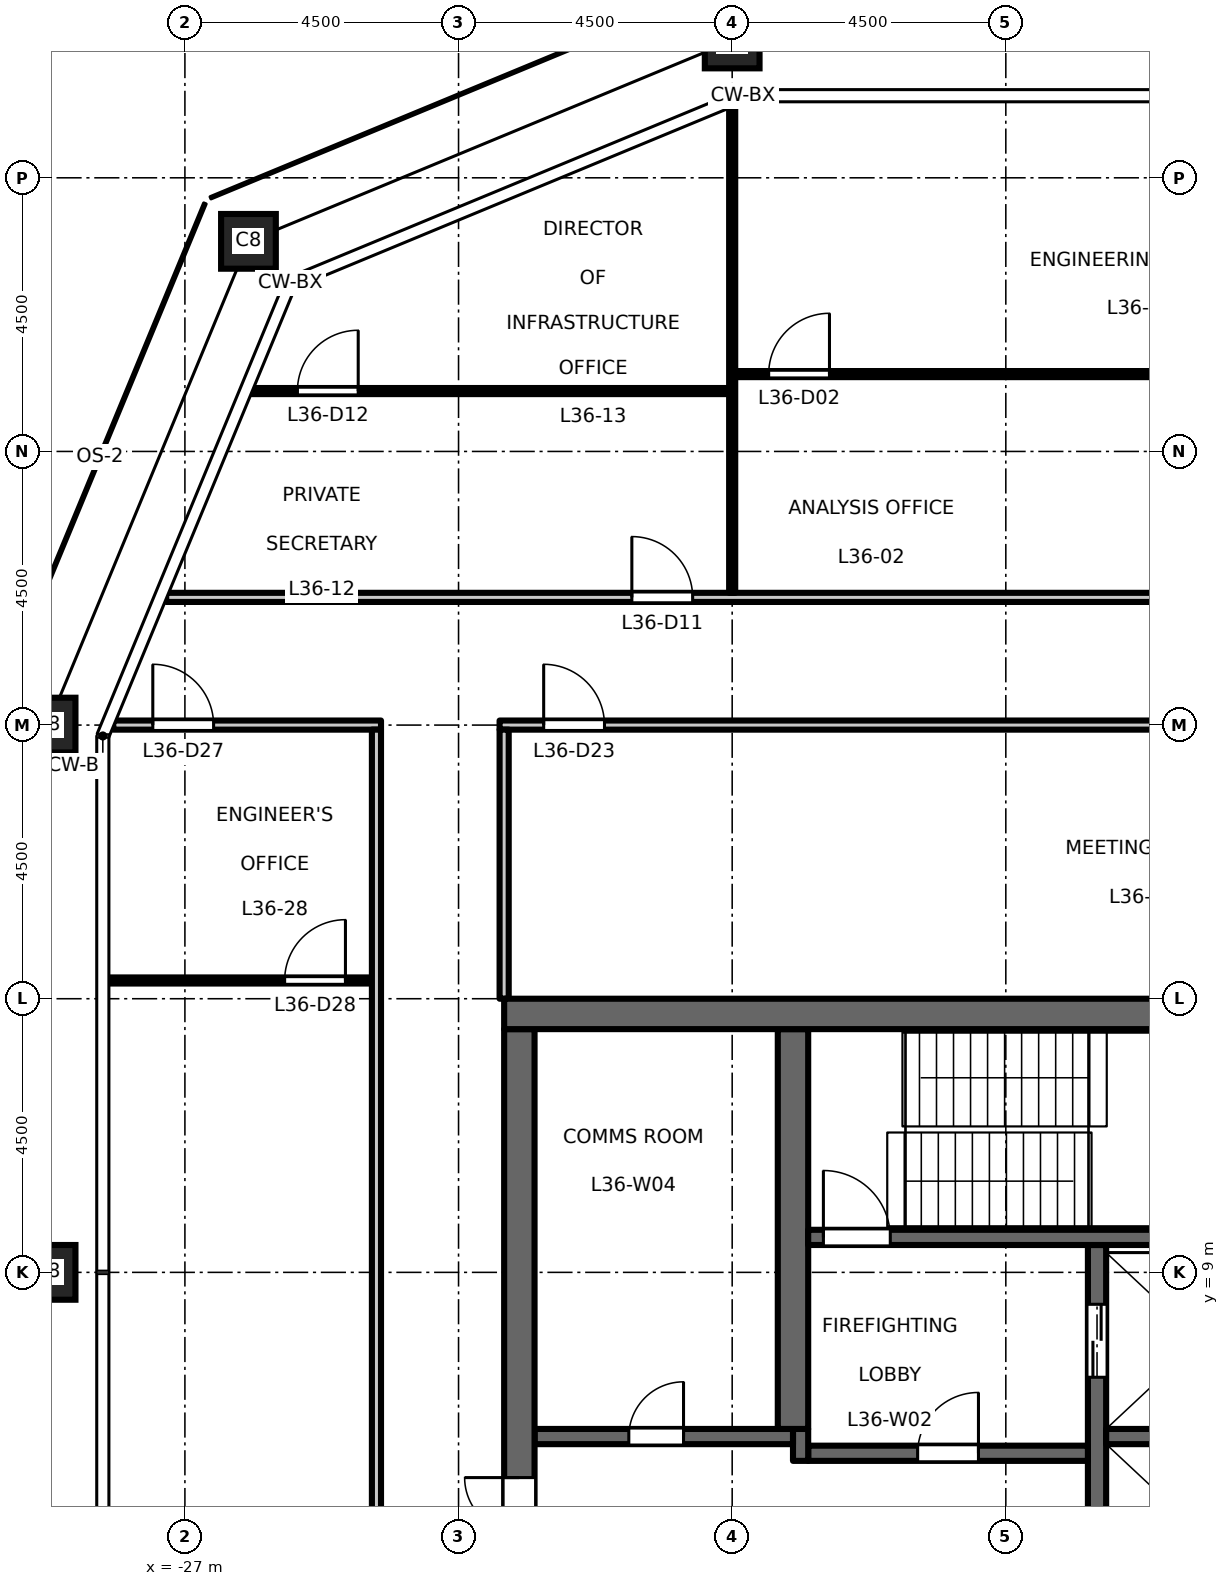
"""IFC4 building model, lengths in metres.
Left out: names, types, materials, properties, quantities, classifications, styles, units other than length and angle.
Written with IfcOpenShell. Run it as: python <this file> out.ifc"""

import sys

from ifc_helpers import new_model, si_unit, direction, frame, frame_2d, origin, origin_2d, place, context, subcontext, project, spatial, rectangle, hollow_rectangle, extrude, element, fill, save


model = new_model("IFC4")
c1 = context("Model", 3, precision=1e-05, world=origin(), true_north=direction((0.0, 1.0)))
c2 = subcontext(c1, "Body", "Model", "MODEL_VIEW")
j1 = project(units=[si_unit("LENGTHUNIT", "METRE"), si_unit("PLANEANGLEUNIT", "RADIAN")], contexts=[c1])
p1 = place(None, origin())
s1 = spatial("IfcSite", under=j1, at=p1, CompositionType="ELEMENT")
p2 = place(p1, origin())
s2 = spatial("IfcBuilding", under=s1, at=p2, CompositionType="ELEMENT")
p3 = place(p2, frame((0.0, 0.0, 167.7)))
s3 = spatial("IfcBuildingStorey", under=s2, at=p3, CompositionType="ELEMENT", Elevation=167.7)
for number, where, z_axis, x_axis in (
    (1, (-18.0, 29.25, 0.0), (0.0, 0.0, 1.0), (1.0, 0.0, 0.0)),
    (2, (-25.955, 25.955, 0.0), (0.0, 0.0, 1.0), (1.0, 0.0, 0.0)),
    (3, (-29.25, 18.0, 0.0), (0.0, 0.0, 1.0), (1.0, 0.0, 0.0)),
    (4, (-29.25, 9.0, 0.0), (0.0, 0.0, 1.0), (1.0, 0.0, 0.0)),
):
    element("IfcColumn", number, at=place(p3, frame(where, z_axis=z_axis, x_axis=x_axis)), inside=s3, PredefinedType="COLUMN", context=c2, shape_type="SweptSolid", body=[
        extrude(hollow_rectangle(XDim=0.9, YDim=0.9, WallThickness=0.05, at=origin_2d()), origin(), (0.0, 0.0, 1.0), 4.5),
    ])
p4 = place(p3, frame((-12.0, -9.45, 0.0), z_axis=(0.0, 0.0, 1.0), x_axis=(0.0, 1.0, 0.0)))
e5 = element("IfcWall", 5, at=p4, inside=s3, PredefinedType="SHEAR", context=c2, shape_type="SweptSolid", body=[
    extrude(rectangle(XDim=18.9, YDim=0.3, at=frame_2d((9.45, 0.0))), origin(), (0.0, 0.0, 1.0), 4.35),
])
p5 = place(p4, frame((3.625, 0.0, 0.0)))
e6 = element("IfcOpeningElement", 6, at=p5, cuts=e5, PredefinedType="OPENING", context=c2, shape_type="SweptSolid", body=[
    extrude(rectangle(XDim=1.1, YDim=2.1, at=frame_2d((0.55, 1.05))), frame((0.0, 0.16, 0.0), z_axis=(0.0, -1.0, 0.0), x_axis=(1.0, 0.0, 0.0)), (0.0, 0.0, 1.0), 0.32),
])
p6 = place(p4, frame((6.775, 0.0, 0.0)))
e7 = element("IfcOpeningElement", 7, at=p6, cuts=e5, PredefinedType="OPENING", context=c2, shape_type="SweptSolid", body=[
    extrude(rectangle(XDim=1.1, YDim=2.1, at=frame_2d((0.55, 1.05))), frame((0.0, 0.16, 0.0), z_axis=(0.0, -1.0, 0.0), x_axis=(1.0, 0.0, 0.0)), (0.0, 0.0, 1.0), 0.32),
])
p7 = place(p4, frame((9.925, 0.0, 0.0)))
e8 = element("IfcOpeningElement", 8, at=p7, cuts=e5, PredefinedType="OPENING", context=c2, shape_type="SweptSolid", body=[
    extrude(rectangle(XDim=1.1, YDim=2.1, at=frame_2d((0.55, 1.05))), frame((0.0, 0.16, 0.0), z_axis=(0.0, -1.0, 0.0), x_axis=(1.0, 0.0, 0.0)), (0.0, 0.0, 1.0), 0.32),
])
p8 = place(p4, frame((13.075, 0.0, 0.0)))
e9 = element("IfcOpeningElement", 9, at=p8, cuts=e5, PredefinedType="OPENING", context=c2, shape_type="SweptSolid", body=[
    extrude(rectangle(XDim=1.1, YDim=2.1, at=frame_2d((0.55, 1.05))), frame((0.0, 0.16, 0.0), z_axis=(0.0, -1.0, 0.0), x_axis=(1.0, 0.0, 0.0)), (0.0, 0.0, 1.0), 0.32),
])
p9 = place(p4, frame((16.725, 0.0, 0.0)))
e10 = element("IfcOpeningElement", 10, at=p9, cuts=e5, PredefinedType="OPENING", context=c2, shape_type="SweptSolid", body=[
    extrude(rectangle(XDim=1.2, YDim=2.1, at=frame_2d((0.6, 1.05))), frame((0.0, 0.16, 0.0), z_axis=(0.0, -1.0, 0.0), x_axis=(1.0, 0.0, 0.0)), (0.0, 0.0, 1.0), 0.32),
])
p10 = place(p4, frame((0.975, 0.0, 0.0)))
e11 = element("IfcOpeningElement", 11, at=p10, cuts=e5, PredefinedType="OPENING", context=c2, shape_type="SweptSolid", body=[
    extrude(rectangle(XDim=1.2, YDim=2.1, at=frame_2d((0.6, 1.05))), frame((0.0, 0.16, 0.0), z_axis=(0.0, -1.0, 0.0), x_axis=(1.0, 0.0, 0.0)), (0.0, 0.0, 1.0), 0.32),
])
p11 = place(p3, frame((-12.15, 6.025, 0.0), z_axis=(0.0, 0.0, 1.0), x_axis=(-1.0, 0.0, 0.0)))
e12 = element("IfcWall", 12, at=p11, inside=s3, PredefinedType="SHEAR", context=c2, shape_type="SweptSolid", body=[
    extrude(rectangle(XDim=4.6, YDim=0.25, at=frame_2d((2.3, 0.0))), origin(), (0.0, 0.0, 1.0), 4.35),
])
p12 = place(p11, frame((1.8, 0.0, 0.0)))
e13 = element("IfcOpeningElement", 13, at=p12, cuts=e12, PredefinedType="OPENING", context=c2, shape_type="SweptSolid", body=[
    extrude(rectangle(XDim=1.0, YDim=2.1, at=frame_2d((0.5, 1.05))), frame((0.0, 0.135, 0.0), z_axis=(0.0, -1.0, 0.0), x_axis=(1.0, 0.0, 0.0)), (0.0, 0.0, 1.0), 0.27),
])
p13 = place(p3, frame((-16.875, 5.9, 0.0), z_axis=(0.0, 0.0, 1.0), x_axis=(0.0, 1.0, 0.0)))
e14 = element("IfcWall", 14, at=p13, inside=s3, PredefinedType="SHEAR", context=c2, shape_type="SweptSolid", body=[
    extrude(rectangle(XDim=0.525, YDim=0.25, at=frame_2d((0.263, 0.0))), origin(), (0.0, 0.0, 1.0), 4.35),
])
p14 = place(p3, frame((-17.0, 6.3, 0.0), z_axis=(0.0, 0.0, 1.0), x_axis=(-1.0, 0.0, 0.0)))
e15 = element("IfcWall", 15, at=p14, inside=s3, PredefinedType="SHEAR", context=c2, shape_type="SweptSolid", body=[
    extrude(rectangle(XDim=4.25, YDim=0.25, at=frame_2d((2.125, 0.0))), origin(), (0.0, 0.0, 1.0), 4.35),
])
p15 = place(p14, frame((1.8, 0.0, 0.0)))
e16 = element("IfcOpeningElement", 16, at=p15, cuts=e15, PredefinedType="OPENING", context=c2, shape_type="SweptSolid", body=[
    extrude(rectangle(XDim=0.9, YDim=2.1, at=frame_2d((0.45, 1.05))), frame((0.0, 0.135, 0.0), z_axis=(0.0, -1.0, 0.0), x_axis=(1.0, 0.0, 0.0)), (0.0, 0.0, 1.0), 0.27),
])
p16 = place(p3, frame((-21.5, -13.0, 0.0), z_axis=(0.0, 0.0, 1.0), x_axis=(0.0, 1.0, 0.0)))
e17 = element("IfcWall", 17, at=p16, inside=s3, PredefinedType="SHEAR", context=c2, shape_type="SweptSolid", body=[
    extrude(rectangle(XDim=26.0, YDim=0.5, at=frame_2d((13.0, 0.0))), origin(), (0.0, 0.0, 1.0), 4.35),
])
p17 = place(p16, frame((16.825, 0.0, 0.0)))
e18 = element("IfcOpeningElement", 18, at=p17, cuts=e17, PredefinedType="OPENING", context=c2, shape_type="SweptSolid", body=[
    extrude(rectangle(XDim=1.8, YDim=2.1, at=frame_2d((0.9, 1.05))), frame((0.0, 0.26, 0.0), z_axis=(0.0, -1.0, 0.0), x_axis=(1.0, 0.0, 0.0)), (0.0, 0.0, 1.0), 0.52),
])
p18 = place(p16, frame((7.375, 0.0, 0.0)))
e19 = element("IfcOpeningElement", 19, at=p18, cuts=e17, PredefinedType="OPENING", context=c2, shape_type="SweptSolid", body=[
    extrude(rectangle(XDim=1.8, YDim=2.1, at=frame_2d((0.9, 1.05))), frame((0.0, 0.26, 0.0), z_axis=(0.0, -1.0, 0.0), x_axis=(1.0, 0.0, 0.0)), (0.0, 0.0, 1.0), 0.52),
])
p19 = place(p16, frame((2.65, 0.0, 0.0)))
e20 = element("IfcOpeningElement", 20, at=p19, cuts=e17, PredefinedType="OPENING", context=c2, shape_type="SweptSolid", body=[
    extrude(rectangle(XDim=0.9, YDim=2.1, at=frame_2d((0.45, 1.05))), frame((0.0, 0.26, 0.0), z_axis=(0.0, -1.0, 0.0), x_axis=(1.0, 0.0, 0.0)), (0.0, 0.0, 1.0), 0.52),
])
p20 = place(p3, frame((-17.0, 6.425, 0.0), z_axis=(0.0, 0.0, 1.0), x_axis=(0.0, 1.0, 0.0)))
e21 = element("IfcWall", 21, at=p20, inside=s3, PredefinedType="SHEAR", context=c2, shape_type="SweptSolid", body=[
    extrude(rectangle(XDim=6.575, YDim=0.5, at=frame_2d((3.288, 0.0))), origin(), (0.0, 0.0, 1.0), 4.35),
])
p21 = place(p3, frame((-8.75, 6.3, 0.0), z_axis=(0.0, 0.0, 1.0), x_axis=(-1.0, 0.0, 0.0)))
e22 = element("IfcWall", 22, at=p21, inside=s3, PredefinedType="SHEAR", context=c2, shape_type="SweptSolid", body=[
    extrude(rectangle(XDim=3.1, YDim=0.25, at=frame_2d((1.55, 0.0))), origin(), (0.0, 0.0, 1.0), 4.35),
])
p22 = place(p3, frame((-8.75, 9.575, 0.0), z_axis=(0.0, 0.0, 1.0), x_axis=(-1.0, 0.0, 0.0)))
e23 = element("IfcWall", 23, at=p22, inside=s3, PredefinedType="SHEAR", context=c2, shape_type="SweptSolid", body=[
    extrude(rectangle(XDim=8.0, YDim=0.25, at=frame_2d((4.0, 0.0))), origin(), (0.0, 0.0, 1.0), 4.35),
])
p23 = place(p22, frame((6.65, 0.0, 0.0)))
e24 = element("IfcOpeningElement", 24, at=p23, cuts=e23, PredefinedType="OPENING", context=c2, shape_type="SweptSolid", body=[
    extrude(rectangle(XDim=1.1, YDim=2.1, at=frame_2d((0.55, 1.05))), frame((0.0, 0.135, 0.0), z_axis=(0.0, -1.0, 0.0), x_axis=(1.0, 0.0, 0.0)), (0.0, 0.0, 1.0), 0.27),
])
p24 = place(p3, frame((-8.25, 13.25, 0.0), z_axis=(0.0, 0.0, 1.0), x_axis=(-1.0, 0.0, 0.0)))
e25 = element("IfcWall", 25, at=p24, inside=s3, PredefinedType="SHEAR", context=c2, shape_type="SweptSolid", body=[
    extrude(rectangle(XDim=13.5, YDim=0.5, at=frame_2d((6.75, 0.0))), origin(), (0.0, 0.0, 1.0), 4.35),
])
p25 = place(p3, frame((-28.26, 13.8, 0.0), z_axis=(0.0, 0.0, 1.0), x_axis=(1.0, 0.0, 0.0)))
e26 = element("IfcWall", 26, at=p25, inside=s3, PredefinedType="PARTITIONING", context=c2, shape_type="SweptSolid", body=[
    extrude(rectangle(XDim=4.335, YDim=0.1, at=frame_2d((2.167, 0.0))), origin(), (0.0, 0.0, 1.0), 4.35),
])
p26 = place(p25, frame((2.9, 0.0, 0.0)))
e27 = element("IfcOpeningElement", 27, at=p26, cuts=e26, PredefinedType="OPENING", context=c2, shape_type="SweptSolid", body=[
    extrude(rectangle(XDim=1.0, YDim=2.1, at=frame_2d((0.5, 1.05))), frame((0.0, 0.06, 0.0), z_axis=(0.0, -1.0, 0.0), x_axis=(1.0, 0.0, 0.0)), (0.0, 0.0, 1.0), 0.12),
])
p27 = place(p3, frame((-28.178, 18.0, 0.0), z_axis=(0.0, 0.0, 1.0), x_axis=(1.0, 0.0, 0.0)))
e28 = element("IfcWall", 28, at=p27, inside=s3, PredefinedType="PARTITIONING", context=c2, shape_type="SweptSolid", body=[
    extrude(rectangle(XDim=4.403, YDim=0.15, at=frame_2d((2.202, 0.0))), origin(), (0.0, 0.0, 1.0), 4.35),
])
p28 = place(p27, frame((0.65, 0.0, 0.0)))
e29 = element("IfcOpeningElement", 29, at=p28, cuts=e28, PredefinedType="OPENING", context=c2, shape_type="SweptSolid", body=[
    extrude(rectangle(XDim=1.0, YDim=2.1, at=frame_2d((0.5, 1.05))), frame((0.0, 0.085, 0.0), z_axis=(0.0, -1.0, 0.0), x_axis=(1.0, 0.0, 0.0)), (0.0, 0.0, 1.0), 0.17),
])
p29 = place(p3, frame((-21.825, 18.0, 0.0), z_axis=(0.0, 0.0, 1.0), x_axis=(1.0, 0.0, 0.0)))
e30 = element("IfcWall", 30, at=p29, inside=s3, PredefinedType="PARTITIONING", context=c2, shape_type="SweptSolid", body=[
    extrude(rectangle(XDim=13.575, YDim=0.15, at=frame_2d((6.788, 0.0))), origin(), (0.0, 0.0, 1.0), 4.35),
])
p30 = place(p29, frame((0.725, 0.0, 0.0)))
e31 = element("IfcOpeningElement", 31, at=p30, cuts=e30, PredefinedType="OPENING", context=c2, shape_type="SweptSolid", body=[
    extrude(rectangle(XDim=1.0, YDim=2.1, at=frame_2d((0.5, 1.05))), frame((0.0, 0.085, 0.0), z_axis=(0.0, -1.0, 0.0), x_axis=(1.0, 0.0, 0.0)), (0.0, 0.0, 1.0), 0.17),
])
p31 = place(p3, frame((-27.308, 20.1, 0.0), z_axis=(0.0, 0.0, 1.0), x_axis=(1.0, 0.0, 0.0)))
e32 = element("IfcWall", 32, at=p31, inside=s3, PredefinedType="PARTITIONING", context=c2, shape_type="SweptSolid", body=[
    extrude(rectangle(XDim=54.616, YDim=0.15, at=frame_2d((27.308, 0.0))), origin(), (0.0, 0.0, 1.0), 4.35),
])
p32 = place(p31, frame((16.658, 0.0, 0.0)))
e33 = element("IfcOpeningElement", 33, at=p32, cuts=e32, PredefinedType="OPENING", context=c2, shape_type="SweptSolid", body=[
    extrude(rectangle(XDim=1.0, YDim=2.1, at=frame_2d((0.5, 1.05))), frame((0.0, 0.085, 0.0), z_axis=(0.0, -1.0, 0.0), x_axis=(1.0, 0.0, 0.0)), (0.0, 0.0, 1.0), 0.17),
])
p33 = place(p31, frame((25.658, 0.0, 0.0)))
e34 = element("IfcOpeningElement", 34, at=p33, cuts=e32, PredefinedType="OPENING", context=c2, shape_type="SweptSolid", body=[
    extrude(rectangle(XDim=1.0, YDim=2.1, at=frame_2d((0.5, 1.05))), frame((0.0, 0.085, 0.0), z_axis=(0.0, -1.0, 0.0), x_axis=(1.0, 0.0, 0.0)), (0.0, 0.0, 1.0), 0.17),
])
p34 = place(p31, frame((27.908, 0.0, 0.0)))
e35 = element("IfcOpeningElement", 35, at=p34, cuts=e32, PredefinedType="OPENING", context=c2, shape_type="SweptSolid", body=[
    extrude(rectangle(XDim=1.0, YDim=2.1, at=frame_2d((0.5, 1.05))), frame((0.0, 0.085, 0.0), z_axis=(0.0, -1.0, 0.0), x_axis=(1.0, 0.0, 0.0)), (0.0, 0.0, 1.0), 0.17),
])
p35 = place(p31, frame((43.658, 0.0, 0.0)))
e36 = element("IfcOpeningElement", 36, at=p35, cuts=e32, PredefinedType="OPENING", context=c2, shape_type="SweptSolid", body=[
    extrude(rectangle(XDim=1.0, YDim=2.1, at=frame_2d((0.5, 1.05))), frame((0.0, 0.085, 0.0), z_axis=(0.0, -1.0, 0.0), x_axis=(1.0, 0.0, 0.0)), (0.0, 0.0, 1.0), 0.17),
])
p36 = place(p31, frame((7.658, 0.0, 0.0)))
e37 = element("IfcOpeningElement", 37, at=p36, cuts=e32, PredefinedType="OPENING", context=c2, shape_type="SweptSolid", body=[
    extrude(rectangle(XDim=1.0, YDim=2.1, at=frame_2d((0.5, 1.05))), frame((0.0, 0.085, 0.0), z_axis=(0.0, -1.0, 0.0), x_axis=(1.0, 0.0, 0.0)), (0.0, 0.0, 1.0), 0.17),
])
p37 = place(p31, frame((52.966, 0.0, 0.0)))
e38 = element("IfcOpeningElement", 38, at=p37, cuts=e32, PredefinedType="OPENING", context=c2, shape_type="SweptSolid", body=[
    extrude(rectangle(XDim=1.0, YDim=2.1, at=frame_2d((0.5, 1.05))), frame((0.0, 0.085, 0.0), z_axis=(0.0, -1.0, 0.0), x_axis=(1.0, 0.0, 0.0)), (0.0, 0.0, 1.0), 0.17),
])
p38 = place(p3, frame((-25.903, 23.493, 0.0), z_axis=(0.0, 0.0, 1.0), x_axis=(1.0, 0.0, 0.0)))
e39 = element("IfcWall", 39, at=p38, inside=s3, PredefinedType="PARTITIONING", context=c2, shape_type="SweptSolid", body=[
    extrude(rectangle(XDim=7.853, YDim=0.1, at=frame_2d((3.927, 0.0))), origin(), (0.0, 0.0, 1.0), 4.35),
])
p39 = place(p38, frame((0.753, 0.0, 0.0)))
e40 = element("IfcOpeningElement", 40, at=p39, cuts=e39, PredefinedType="OPENING", context=c2, shape_type="SweptSolid", body=[
    extrude(rectangle(XDim=1.0, YDim=2.1, at=frame_2d((0.5, 1.05))), frame((0.0, 0.06, 0.0), z_axis=(0.0, -1.0, 0.0), x_axis=(1.0, 0.0, 0.0)), (0.0, 0.0, 1.0), 0.12),
])
p40 = place(p3, frame((-17.95, 23.772, 0.0), z_axis=(0.0, 0.0, 1.0), x_axis=(1.0, 0.0, 0.0)))
e41 = element("IfcWall", 41, at=p40, inside=s3, PredefinedType="PARTITIONING", context=c2, shape_type="SweptSolid", body=[
    extrude(rectangle(XDim=8.9, YDim=0.1, at=frame_2d((4.45, 0.0))), origin(), (0.0, 0.0, 1.0), 4.35),
])
p41 = place(p40, frame((0.55, 0.0, 0.0)))
e42 = element("IfcOpeningElement", 42, at=p41, cuts=e41, PredefinedType="OPENING", context=c2, shape_type="SweptSolid", body=[
    extrude(rectangle(XDim=1.0, YDim=2.1, at=frame_2d((0.5, 1.05))), frame((0.0, 0.06, 0.0), z_axis=(0.0, -1.0, 0.0), x_axis=(1.0, 0.0, 0.0)), (0.0, 0.0, 1.0), 0.12),
])
p42 = place(p3, frame((-23.85, -17.925, 0.0), z_axis=(0.0, 0.0, 1.0), x_axis=(0.0, 1.0, 0.0)))
e43 = element("IfcWall", 43, at=p42, inside=s3, PredefinedType="PARTITIONING", context=c2, shape_type="SweptSolid", body=[
    extrude(rectangle(XDim=35.85, YDim=0.15, at=frame_2d((17.925, 0.0))), origin(), (0.0, 0.0, 1.0), 4.35),
])
p43 = place(p3, frame((-21.75, 13.5, 0.0), z_axis=(0.0, 0.0, 1.0), x_axis=(0.0, 1.0, 0.0)))
e44 = element("IfcWall", 44, at=p43, inside=s3, PredefinedType="PARTITIONING", context=c2, shape_type="SweptSolid", body=[
    extrude(rectangle(XDim=4.425, YDim=0.15, at=frame_2d((2.212, 0.0))), origin(), (0.0, 0.0, 1.0), 4.35),
])
p44 = place(p3, frame((-18.0, 20.175, 0.0), z_axis=(0.0, 0.0, 1.0), x_axis=(0.0, 1.0, 0.0)))
e45 = element("IfcWall", 45, at=p44, inside=s3, PredefinedType="PARTITIONING", context=c2, shape_type="SweptSolid", body=[
    extrude(rectangle(XDim=8.003, YDim=0.1, at=frame_2d((4.001, 0.0))), origin(), (0.0, 0.0, 1.0), 3.45),
])
p45 = place(p12, origin())
e46 = element("IfcDoor", 46, at=p45, inside=s3, OperationType="SINGLE_SWING_LEFT", PredefinedType="DOOR", context=c2, shape_type="SweptSolid", body=[
    extrude(rectangle(XDim=1.0, YDim=2.1, at=frame_2d((0.5, 1.05))), frame((0.0, 0.025, 0.0), z_axis=(0.0, -1.0, 0.0), x_axis=(1.0, 0.0, 0.0)), (0.0, 0.0, 1.0), 0.05),
])
fill(e13, e46)
p46 = place(p23, origin())
e47 = element("IfcDoor", 47, at=p46, inside=s3, OperationType="SINGLE_SWING_RIGHT", PredefinedType="DOOR", context=c2, shape_type="SweptSolid", body=[
    extrude(rectangle(XDim=1.1, YDim=2.1, at=frame_2d((0.55, 1.05))), frame((0.0, 0.025, 0.0), z_axis=(0.0, -1.0, 0.0), x_axis=(1.0, 0.0, 0.0)), (0.0, 0.0, 1.0), 0.05),
])
fill(e24, e47)
p47 = place(p17, origin())
e48 = element("IfcDoor", 48, at=p47, inside=s3, OperationType="DOUBLE_DOOR_DOUBLE_SWING", PredefinedType="DOOR", context=c2, shape_type="SweptSolid", body=[
    extrude(rectangle(XDim=1.8, YDim=2.1, at=frame_2d((0.9, 1.05))), frame((0.0, 0.025, 0.0), z_axis=(0.0, -1.0, 0.0), x_axis=(1.0, 0.0, 0.0)), (0.0, 0.0, 1.0), 0.05),
])
fill(e18, e48)
p48 = place(p9, origin())
e49 = element("IfcDoor", 49, at=p48, inside=s3, OperationType="DOUBLE_DOOR_SLIDING", PredefinedType="DOOR", context=c2, shape_type="SweptSolid", body=[
    extrude(rectangle(XDim=1.2, YDim=2.1, at=frame_2d((0.6, 1.05))), frame((0.0, 0.025, 0.0), z_axis=(0.0, -1.0, 0.0), x_axis=(1.0, 0.0, 0.0)), (0.0, 0.0, 1.0), 0.05),
])
fill(e10, e49)
p49 = place(p15, origin())
e50 = element("IfcDoor", 50, at=p49, inside=s3, OperationType="SINGLE_SWING_LEFT", PredefinedType="DOOR", context=c2, shape_type="SweptSolid", body=[
    extrude(rectangle(XDim=0.9, YDim=2.1, at=frame_2d((0.45, 1.05))), frame((0.0, 0.025, 0.0), z_axis=(0.0, -1.0, 0.0), x_axis=(1.0, 0.0, 0.0)), (0.0, 0.0, 1.0), 0.05),
])
fill(e16, e50)
p50 = place(p41, origin())
e51 = element("IfcDoor", 51, at=p50, inside=s3, OperationType="SINGLE_SWING_RIGHT", PredefinedType="DOOR", context=c2, shape_type="SweptSolid", body=[
    extrude(rectangle(XDim=1.0, YDim=2.1, at=frame_2d((0.5, 1.05))), frame((0.0, 0.025, 0.0), z_axis=(0.0, -1.0, 0.0), x_axis=(1.0, 0.0, 0.0)), (0.0, 0.0, 1.0), 0.05),
])
fill(e42, e51)
p51 = place(p36, origin())
e52 = element("IfcDoor", 52, at=p51, inside=s3, OperationType="SINGLE_SWING_LEFT", PredefinedType="DOOR", context=c2, shape_type="SweptSolid", body=[
    extrude(rectangle(XDim=1.0, YDim=2.1, at=frame_2d((0.5, 1.05))), frame((0.0, 0.025, 0.0), z_axis=(0.0, -1.0, 0.0), x_axis=(1.0, 0.0, 0.0)), (0.0, 0.0, 1.0), 0.05),
])
fill(e37, e52)
p52 = place(p39, origin())
e53 = element("IfcDoor", 53, at=p52, inside=s3, OperationType="SINGLE_SWING_RIGHT", PredefinedType="DOOR", context=c2, shape_type="SweptSolid", body=[
    extrude(rectangle(XDim=1.0, YDim=2.1, at=frame_2d((0.5, 1.05))), frame((0.0, 0.025, 0.0), z_axis=(0.0, -1.0, 0.0), x_axis=(1.0, 0.0, 0.0)), (0.0, 0.0, 1.0), 0.05),
])
fill(e40, e53)
p53 = place(p30, origin())
e54 = element("IfcDoor", 54, at=p53, inside=s3, OperationType="SINGLE_SWING_LEFT", PredefinedType="DOOR", context=c2, shape_type="SweptSolid", body=[
    extrude(rectangle(XDim=1.0, YDim=2.1, at=frame_2d((0.5, 1.05))), frame((0.0, 0.025, 0.0), z_axis=(0.0, -1.0, 0.0), x_axis=(1.0, 0.0, 0.0)), (0.0, 0.0, 1.0), 0.05),
])
fill(e31, e54)
p54 = place(p28, origin())
e55 = element("IfcDoor", 55, at=p54, inside=s3, OperationType="SINGLE_SWING_LEFT", PredefinedType="DOOR", context=c2, shape_type="SweptSolid", body=[
    extrude(rectangle(XDim=1.0, YDim=2.1, at=frame_2d((0.5, 1.05))), frame((0.0, 0.025, 0.0), z_axis=(0.0, -1.0, 0.0), x_axis=(1.0, 0.0, 0.0)), (0.0, 0.0, 1.0), 0.05),
])
fill(e29, e55)
p55 = place(p26, origin())
e56 = element("IfcDoor", 56, at=p55, inside=s3, OperationType="SINGLE_SWING_RIGHT", PredefinedType="DOOR", context=c2, shape_type="SweptSolid", body=[
    extrude(rectangle(XDim=1.0, YDim=2.1, at=frame_2d((0.5, 1.05))), frame((0.0, 0.025, 0.0), z_axis=(0.0, -1.0, 0.0), x_axis=(1.0, 0.0, 0.0)), (0.0, 0.0, 1.0), 0.05),
])
fill(e27, e56)
save(model, sys.argv[1])
